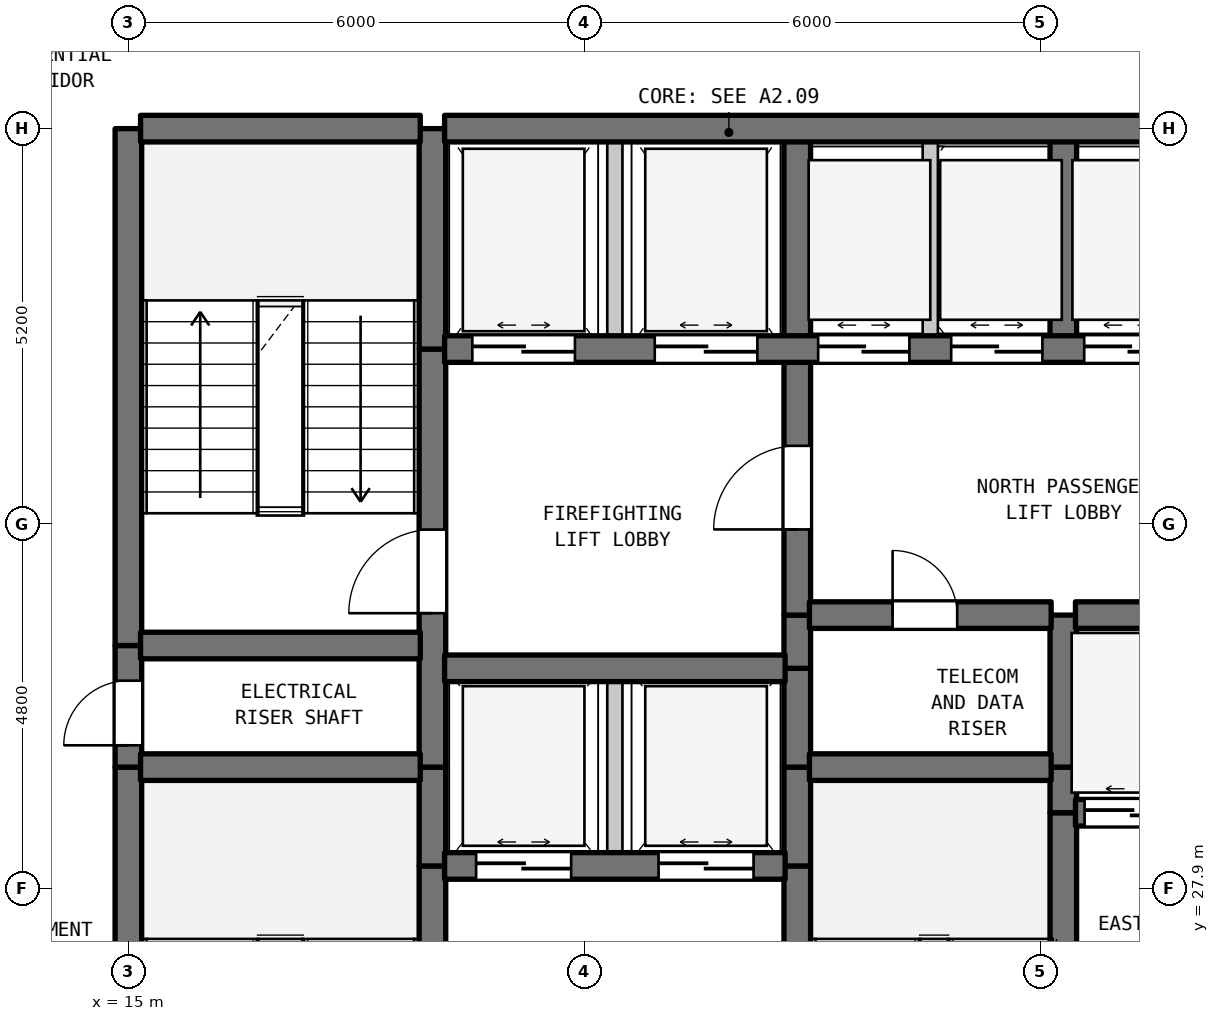
"""IFC4 building model, lengths in metres.
Left out: names, types, materials, properties, quantities, classifications, styles, units other than length and angle.
Written with IfcOpenShell. Run it as: python <this file> out.ifc"""

import sys

from ifc_helpers import new_model, si_unit, direction, frame, frame_2d, origin, place, context, subcontext, project, spatial, rectangle, extrude, element, fill, save


model = new_model("IFC4")
c1 = context("Model", 3, precision=1e-05, world=origin(), true_north=direction((0.0, 1.0)))
c2 = subcontext(c1, "Body", "Model", "MODEL_VIEW")
j1 = project(units=[si_unit("LENGTHUNIT", "METRE"), si_unit("PLANEANGLEUNIT", "RADIAN")], contexts=[c1])
p1 = place(None, origin())
s1 = spatial("IfcSite", under=j1, at=p1, CompositionType="ELEMENT")
p2 = place(p1, origin())
s2 = spatial("IfcBuilding", under=s1, at=p2, CompositionType="ELEMENT")
p3 = place(p2, frame((0.0, 0.0, 70.1)))
s3 = spatial("IfcBuildingStorey", under=s2, at=p3, CompositionType="ELEMENT", Elevation=70.1)
p4 = place(p3, frame((15.0, 22.7, 0.0), z_axis=(0.0, 0.0, 1.0), x_axis=(0.0, 1.0, 0.0)))
e1 = element("IfcWall", 1, at=p4, inside=s3, PredefinedType="SHEAR", context=c2, shape_type="SweptSolid", body=[
    extrude(rectangle(XDim=6.8, YDim=0.35, at=frame_2d((3.4, 0.0))), origin(), (0.0, 0.0, 1.0), 3.385),
])
p5 = place(p3, frame((15.0, 29.5, 0.0), z_axis=(0.0, 0.0, 1.0), x_axis=(0.0, 1.0, 0.0)))
e2 = element("IfcWall", 2, at=p5, inside=s3, PredefinedType="SHEAR", context=c2, shape_type="SweptSolid", body=[
    extrude(rectangle(XDim=1.6, YDim=0.35, at=frame_2d((0.8, 0.0))), origin(), (0.0, 0.0, 1.0), 3.385),
])
p6 = place(p5, frame((0.287, 0.0, 0.0)))
e3 = element("IfcOpeningElement", 3, at=p6, cuts=e2, PredefinedType="OPENING", context=c2, shape_type="SweptSolid", body=[
    extrude(rectangle(XDim=0.85, YDim=2.1, at=frame_2d((0.425, 1.05))), frame((0.0, 0.185, 0.0), z_axis=(0.0, -1.0, 0.0), x_axis=(1.0, 0.0, 0.0)), (0.0, 0.0, 1.0), 0.37),
])
p7 = place(p3, frame((15.0, 31.1, 0.0), z_axis=(0.0, 0.0, 1.0), x_axis=(0.0, 1.0, 0.0)))
e4 = element("IfcWall", 4, at=p7, inside=s3, PredefinedType="SHEAR", context=c2, shape_type="SweptSolid", body=[
    extrude(rectangle(XDim=6.8, YDim=0.35, at=frame_2d((3.4, 0.0))), origin(), (0.0, 0.0, 1.0), 3.385),
])
p8 = place(p3, frame((19.0, 22.7, 0.0), z_axis=(0.0, 0.0, 1.0), x_axis=(0.0, 1.0, 0.0)))
e5 = element("IfcWall", 5, at=p8, inside=s3, PredefinedType="SHEAR", context=c2, shape_type="SweptSolid", body=[
    extrude(rectangle(XDim=5.5, YDim=0.35, at=frame_2d((2.75, 0.0))), origin(), (0.0, 0.0, 1.0), 3.385),
])
p9 = place(p8, frame((0.631, 0.0, 0.0)))
e6 = element("IfcOpeningElement", 6, at=p9, cuts=e5, PredefinedType="OPENING", context=c2, shape_type="SweptSolid", body=[
    extrude(rectangle(XDim=1.1, YDim=2.15, at=frame_2d((0.55, 1.075))), frame((0.0, 0.185, 0.0), z_axis=(0.0, -1.0, 0.0), x_axis=(1.0, 0.0, 0.0)), (0.0, 0.0, 1.0), 0.37),
])
p10 = place(p3, frame((19.0, 28.2, 0.0), z_axis=(0.0, 0.0, 1.0), x_axis=(0.0, 1.0, 0.0)))
e7 = element("IfcWall", 7, at=p10, inside=s3, PredefinedType="SHEAR", context=c2, shape_type="SweptSolid", body=[
    extrude(rectangle(XDim=1.3, YDim=0.35, at=frame_2d((0.65, 0.0))), origin(), (0.0, 0.0, 1.0), 3.385),
])
p11 = place(p3, frame((19.0, 29.5, 0.0), z_axis=(0.0, 0.0, 1.0), x_axis=(0.0, 1.0, 0.0)))
e8 = element("IfcWall", 8, at=p11, inside=s3, PredefinedType="SHEAR", context=c2, shape_type="SweptSolid", body=[
    extrude(rectangle(XDim=5.5, YDim=0.35, at=frame_2d((2.75, 0.0))), origin(), (0.0, 0.0, 1.0), 3.385),
])
p12 = place(p11, frame((2.025, 0.0, 0.0)))
e9 = element("IfcOpeningElement", 9, at=p12, cuts=e8, PredefinedType="OPENING", context=c2, shape_type="SweptSolid", body=[
    extrude(rectangle(XDim=1.1, YDim=2.15, at=frame_2d((0.55, 1.075))), frame((0.0, 0.185, 0.0), z_axis=(0.0, -1.0, 0.0), x_axis=(1.0, 0.0, 0.0)), (0.0, 0.0, 1.0), 0.37),
])
p13 = place(p3, frame((19.0, 35.0, 0.0), z_axis=(0.0, 0.0, 1.0), x_axis=(0.0, 1.0, 0.0)))
e10 = element("IfcWall", 10, at=p13, inside=s3, PredefinedType="SHEAR", context=c2, shape_type="SweptSolid", body=[
    extrude(rectangle(XDim=2.9, YDim=0.35, at=frame_2d((1.45, 0.0))), origin(), (0.0, 0.0, 1.0), 3.385),
])
p14 = place(p3, frame((21.4, 28.2, 0.0), z_axis=(0.0, 0.0, 1.0), x_axis=(0.0, 1.0, 0.0)))
e11 = element("IfcWall", 11, at=p14, inside=s3, PredefinedType="STANDARD", context=c2, shape_type="SweptSolid", body=[
    extrude(rectangle(XDim=2.6, YDim=0.2, at=frame_2d((1.3, 0.0))), origin(), (0.0, 0.0, 1.0), 3.385),
])
p15 = place(p3, frame((21.4, 35.0, 0.0), z_axis=(0.0, 0.0, 1.0), x_axis=(0.0, 1.0, 0.0)))
e12 = element("IfcWall", 12, at=p15, inside=s3, PredefinedType="STANDARD", context=c2, shape_type="SweptSolid", body=[
    extrude(rectangle(XDim=2.9, YDim=0.2, at=frame_2d((1.45, 0.0))), origin(), (0.0, 0.0, 1.0), 3.385),
])
p16 = place(p3, frame((23.8, 22.7, 0.0), z_axis=(0.0, 0.0, 1.0), x_axis=(0.0, 1.0, 0.0)))
e13 = element("IfcWall", 13, at=p16, inside=s3, PredefinedType="SHEAR", context=c2, shape_type="SweptSolid", body=[
    extrude(rectangle(XDim=5.5, YDim=0.35, at=frame_2d((2.75, 0.0))), origin(), (0.0, 0.0, 1.0), 3.385),
])
p17 = place(p16, frame((0.235, 0.0, 0.0)))
e14 = element("IfcOpeningElement", 14, at=p17, cuts=e13, PredefinedType="OPENING", context=c2, shape_type="SweptSolid", body=[
    extrude(rectangle(XDim=1.1, YDim=2.15, at=frame_2d((0.55, 1.075))), frame((0.0, 0.185, 0.0), z_axis=(0.0, -1.0, 0.0), x_axis=(1.0, 0.0, 0.0)), (0.0, 0.0, 1.0), 0.37),
])
for number, where, z_axis, x_axis in (
    (15, (23.8, 28.2, 0.0), (0.0, 0.0, 1.0), (0.0, 1.0, 0.0)),
    (16, (23.8, 29.5, 0.0), (0.0, 0.0, 1.0), (0.0, 1.0, 0.0)),
):
    element("IfcWall", number, at=place(p3, frame(where, z_axis=z_axis, x_axis=x_axis)), inside=s3, PredefinedType="SHEAR", context=c2, shape_type="SweptSolid", body=[
        extrude(rectangle(XDim=1.3, YDim=0.35, at=frame_2d((0.65, 0.0))), origin(), (0.0, 0.0, 1.0), 3.385),
    ])
p18 = place(p3, frame((23.8, 30.8, 0.0), z_axis=(0.0, 0.0, 1.0), x_axis=(0.0, 1.0, 0.0)))
e17 = element("IfcWall", 17, at=p18, inside=s3, PredefinedType="SHEAR", context=c2, shape_type="SweptSolid", body=[
    extrude(rectangle(XDim=0.7, YDim=0.35, at=frame_2d((0.35, 0.0))), origin(), (0.0, 0.0, 1.0), 3.385),
])
p19 = place(p3, frame((23.8, 31.5, 0.0), z_axis=(0.0, 0.0, 1.0), x_axis=(0.0, 1.0, 0.0)))
e18 = element("IfcWall", 18, at=p19, inside=s3, PredefinedType="SHEAR", context=c2, shape_type="SweptSolid", body=[
    extrude(rectangle(XDim=3.5, YDim=0.35, at=frame_2d((1.75, 0.0))), origin(), (0.0, 0.0, 1.0), 3.385),
])
p20 = place(p19, frame((1.127, 0.0, 0.0)))
e19 = element("IfcOpeningElement", 19, at=p20, cuts=e18, PredefinedType="OPENING", context=c2, shape_type="SweptSolid", body=[
    extrude(rectangle(XDim=1.1, YDim=2.15, at=frame_2d((0.55, 1.075))), frame((0.0, 0.185, 0.0), z_axis=(0.0, -1.0, 0.0), x_axis=(1.0, 0.0, 0.0)), (0.0, 0.0, 1.0), 0.37),
])
p21 = place(p3, frame((23.8, 35.0, 0.0), z_axis=(0.0, 0.0, 1.0), x_axis=(0.0, 1.0, 0.0)))
e20 = element("IfcWall", 20, at=p21, inside=s3, PredefinedType="SHEAR", context=c2, shape_type="SweptSolid", body=[
    extrude(rectangle(XDim=2.9, YDim=0.35, at=frame_2d((1.45, 0.0))), origin(), (0.0, 0.0, 1.0), 3.385),
])
p22 = place(p3, frame((25.55, 35.0, 0.0), z_axis=(0.0, 0.0, 1.0), x_axis=(0.0, 1.0, 0.0)))
e21 = element("IfcWall", 21, at=p22, inside=s3, PredefinedType="STANDARD", context=c2, shape_type="SweptSolid", body=[
    extrude(rectangle(XDim=2.9, YDim=0.2, at=frame_2d((1.45, 0.0))), origin(), (0.0, 0.0, 1.0), 3.385),
])
p23 = place(p3, frame((27.3, 25.6, 0.0), z_axis=(0.0, 0.0, 1.0), x_axis=(0.0, 1.0, 0.0)))
e22 = element("IfcWall", 22, at=p23, inside=s3, PredefinedType="SHEAR", context=c2, shape_type="SweptSolid", body=[
    extrude(rectangle(XDim=3.3, YDim=0.35, at=frame_2d((1.65, 0.0))), origin(), (0.0, 0.0, 1.0), 3.385),
])
p24 = place(p3, frame((27.3, 28.9, 0.0), z_axis=(0.0, 0.0, 1.0), x_axis=(0.0, 1.0, 0.0)))
e23 = element("IfcWall", 23, at=p24, inside=s3, PredefinedType="SHEAR", context=c2, shape_type="SweptSolid", body=[
    extrude(rectangle(XDim=0.6, YDim=0.35, at=frame_2d((0.3, 0.0))), origin(), (0.0, 0.0, 1.0), 3.385),
])
p25 = place(p3, frame((27.3, 29.5, 0.0), z_axis=(0.0, 0.0, 1.0), x_axis=(0.0, 1.0, 0.0)))
e24 = element("IfcWall", 24, at=p25, inside=s3, PredefinedType="SHEAR", context=c2, shape_type="SweptSolid", body=[
    extrude(rectangle(XDim=2.0, YDim=0.35, at=frame_2d((1.0, 0.0))), origin(), (0.0, 0.0, 1.0), 3.385),
])
p26 = place(p3, frame((27.3, 35.0, 0.0), z_axis=(0.0, 0.0, 1.0), x_axis=(0.0, 1.0, 0.0)))
e25 = element("IfcWall", 25, at=p26, inside=s3, PredefinedType="SHEAR", context=c2, shape_type="SweptSolid", body=[
    extrude(rectangle(XDim=2.9, YDim=0.35, at=frame_2d((1.45, 0.0))), origin(), (0.0, 0.0, 1.0), 3.385),
])
p27 = place(p3, frame((19.16, 28.2, 0.0), z_axis=(0.0, 0.0, 1.0), x_axis=(1.0, 0.0, 0.0)))
e26 = element("IfcWall", 26, at=p27, inside=s3, PredefinedType="SHEAR", context=c2, shape_type="SweptSolid", body=[
    extrude(rectangle(XDim=4.48, YDim=0.35, at=frame_2d((2.24, 0.0))), origin(), (0.0, 0.0, 1.0), 3.385),
])
p28 = place(p27, frame((0.415, 0.0, 0.0)))
e27 = element("IfcOpeningElement", 27, at=p28, cuts=e26, PredefinedType="OPENING", context=c2, shape_type="SweptSolid", body=[
    extrude(rectangle(XDim=1.25, YDim=2.2, at=frame_2d((0.625, 1.1))), frame((0.0, 0.185, 0.0), z_axis=(0.0, -1.0, 0.0), x_axis=(1.0, 0.0, 0.0)), (0.0, 0.0, 1.0), 0.37),
])
p29 = place(p27, frame((2.815, 0.0, 0.0)))
e28 = element("IfcOpeningElement", 28, at=p29, cuts=e26, PredefinedType="OPENING", context=c2, shape_type="SweptSolid", body=[
    extrude(rectangle(XDim=1.25, YDim=2.2, at=frame_2d((0.625, 1.1))), frame((0.0, 0.185, 0.0), z_axis=(0.0, -1.0, 0.0), x_axis=(1.0, 0.0, 0.0)), (0.0, 0.0, 1.0), 0.37),
])
p30 = place(p3, frame((27.46, 28.9, 0.0), z_axis=(0.0, 0.0, 1.0), x_axis=(1.0, 0.0, 0.0)))
e29 = element("IfcWall", 29, at=p30, inside=s3, PredefinedType="SHEAR", context=c2, shape_type="SweptSolid", body=[
    extrude(rectangle(XDim=3.18, YDim=0.35, at=frame_2d((1.59, 0.0))), origin(), (0.0, 0.0, 1.0), 3.385),
])
p31 = place(p30, frame((0.12, 0.0, 0.0)))
e30 = element("IfcOpeningElement", 30, at=p31, cuts=e29, PredefinedType="OPENING", context=c2, shape_type="SweptSolid", body=[
    extrude(rectangle(XDim=1.25, YDim=2.2, at=frame_2d((0.625, 1.1))), frame((0.0, 0.185, 0.0), z_axis=(0.0, -1.0, 0.0), x_axis=(1.0, 0.0, 0.0)), (0.0, 0.0, 1.0), 0.37),
])
p32 = place(p30, frame((1.81, 0.0, 0.0)))
e31 = element("IfcOpeningElement", 31, at=p32, cuts=e29, PredefinedType="OPENING", context=c2, shape_type="SweptSolid", body=[
    extrude(rectangle(XDim=1.25, YDim=2.2, at=frame_2d((0.625, 1.1))), frame((0.0, 0.185, 0.0), z_axis=(0.0, -1.0, 0.0), x_axis=(1.0, 0.0, 0.0)), (0.0, 0.0, 1.0), 0.37),
])
p33 = place(p3, frame((15.16, 29.5, 0.0), z_axis=(0.0, 0.0, 1.0), x_axis=(1.0, 0.0, 0.0)))
e32 = element("IfcWall", 32, at=p33, inside=s3, PredefinedType="SHEAR", context=c2, shape_type="SweptSolid", body=[
    extrude(rectangle(XDim=3.68, YDim=0.35, at=frame_2d((1.84, 0.0))), origin(), (0.0, 0.0, 1.0), 3.385),
])
p34 = place(p3, frame((23.96, 29.5, 0.0), z_axis=(0.0, 0.0, 1.0), x_axis=(1.0, 0.0, 0.0)))
e33 = element("IfcWall", 33, at=p34, inside=s3, PredefinedType="SHEAR", context=c2, shape_type="SweptSolid", body=[
    extrude(rectangle(XDim=3.18, YDim=0.35, at=frame_2d((1.59, 0.0))), origin(), (0.0, 0.0, 1.0), 3.385),
])
p35 = place(p3, frame((19.16, 30.8, 0.0), z_axis=(0.0, 0.0, 1.0), x_axis=(1.0, 0.0, 0.0)))
e34 = element("IfcWall", 34, at=p35, inside=s3, PredefinedType="SHEAR", context=c2, shape_type="SweptSolid", body=[
    extrude(rectangle(XDim=4.48, YDim=0.35, at=frame_2d((2.24, 0.0))), origin(), (0.0, 0.0, 1.0), 3.385),
])
p36 = place(p3, frame((15.16, 31.1, 0.0), z_axis=(0.0, 0.0, 1.0), x_axis=(1.0, 0.0, 0.0)))
e35 = element("IfcWall", 35, at=p36, inside=s3, PredefinedType="SHEAR", context=c2, shape_type="SweptSolid", body=[
    extrude(rectangle(XDim=3.68, YDim=0.35, at=frame_2d((1.84, 0.0))), origin(), (0.0, 0.0, 1.0), 3.385),
])
p37 = place(p3, frame((23.96, 31.5, 0.0), z_axis=(0.0, 0.0, 1.0), x_axis=(1.0, 0.0, 0.0)))
e36 = element("IfcWall", 36, at=p37, inside=s3, PredefinedType="SHEAR", context=c2, shape_type="SweptSolid", body=[
    extrude(rectangle(XDim=3.18, YDim=0.35, at=frame_2d((1.59, 0.0))), origin(), (0.0, 0.0, 1.0), 3.385),
])
p38 = place(p37, frame((1.094, 0.0, 0.0)))
e37 = element("IfcOpeningElement", 37, at=p38, cuts=e36, PredefinedType="OPENING", context=c2, shape_type="SweptSolid", body=[
    extrude(rectangle(XDim=0.85, YDim=2.1, at=frame_2d((0.425, 1.05))), frame((0.0, 0.185, 0.0), z_axis=(0.0, -1.0, 0.0), x_axis=(1.0, 0.0, 0.0)), (0.0, 0.0, 1.0), 0.37),
])
p39 = place(p3, frame((27.46, 31.5, 0.0), z_axis=(0.0, 0.0, 1.0), x_axis=(1.0, 0.0, 0.0)))
e38 = element("IfcWall", 38, at=p39, inside=s3, PredefinedType="SHEAR", context=c2, shape_type="SweptSolid", body=[
    extrude(rectangle(XDim=3.18, YDim=0.35, at=frame_2d((1.59, 0.0))), origin(), (0.0, 0.0, 1.0), 3.385),
])
p40 = place(p3, frame((19.16, 35.0, 0.0), z_axis=(0.0, 0.0, 1.0), x_axis=(1.0, 0.0, 0.0)))
e39 = element("IfcWall", 39, at=p40, inside=s3, PredefinedType="SHEAR", context=c2, shape_type="SweptSolid", body=[
    extrude(rectangle(XDim=11.48, YDim=0.35, at=frame_2d((5.74, 0.0))), origin(), (0.0, 0.0, 1.0), 3.385),
])
p41 = place(p40, frame((0.365, 0.0, 0.0)))
e40 = element("IfcOpeningElement", 40, at=p41, cuts=e39, PredefinedType="OPENING", context=c2, shape_type="SweptSolid", body=[
    extrude(rectangle(XDim=1.35, YDim=2.2, at=frame_2d((0.675, 1.1))), frame((0.0, 0.185, 0.0), z_axis=(0.0, -1.0, 0.0), x_axis=(1.0, 0.0, 0.0)), (0.0, 0.0, 1.0), 0.37),
])
p42 = place(p40, frame((2.765, 0.0, 0.0)))
e41 = element("IfcOpeningElement", 41, at=p42, cuts=e39, PredefinedType="OPENING", context=c2, shape_type="SweptSolid", body=[
    extrude(rectangle(XDim=1.35, YDim=2.2, at=frame_2d((0.675, 1.1))), frame((0.0, 0.185, 0.0), z_axis=(0.0, -1.0, 0.0), x_axis=(1.0, 0.0, 0.0)), (0.0, 0.0, 1.0), 0.37),
])
p43 = place(p40, frame((4.915, 0.0, 0.0)))
e42 = element("IfcOpeningElement", 42, at=p43, cuts=e39, PredefinedType="OPENING", context=c2, shape_type="SweptSolid", body=[
    extrude(rectangle(XDim=1.2, YDim=2.2, at=frame_2d((0.6, 1.1))), frame((0.0, 0.185, 0.0), z_axis=(0.0, -1.0, 0.0), x_axis=(1.0, 0.0, 0.0)), (0.0, 0.0, 1.0), 0.37),
])
p44 = place(p40, frame((6.665, 0.0, 0.0)))
e43 = element("IfcOpeningElement", 43, at=p44, cuts=e39, PredefinedType="OPENING", context=c2, shape_type="SweptSolid", body=[
    extrude(rectangle(XDim=1.2, YDim=2.2, at=frame_2d((0.6, 1.1))), frame((0.0, 0.185, 0.0), z_axis=(0.0, -1.0, 0.0), x_axis=(1.0, 0.0, 0.0)), (0.0, 0.0, 1.0), 0.37),
])
p45 = place(p40, frame((8.415, 0.0, 0.0)))
e44 = element("IfcOpeningElement", 44, at=p45, cuts=e39, PredefinedType="OPENING", context=c2, shape_type="SweptSolid", body=[
    extrude(rectangle(XDim=1.2, YDim=2.2, at=frame_2d((0.6, 1.1))), frame((0.0, 0.185, 0.0), z_axis=(0.0, -1.0, 0.0), x_axis=(1.0, 0.0, 0.0)), (0.0, 0.0, 1.0), 0.37),
])
p46 = place(p40, frame((10.16, 0.0, 0.0)))
e45 = element("IfcOpeningElement", 45, at=p46, cuts=e39, PredefinedType="OPENING", context=c2, shape_type="SweptSolid", body=[
    extrude(rectangle(XDim=1.2, YDim=2.2, at=frame_2d((0.6, 1.1))), frame((0.0, 0.185, 0.0), z_axis=(0.0, -1.0, 0.0), x_axis=(1.0, 0.0, 0.0)), (0.0, 0.0, 1.0), 0.37),
])
p47 = place(p3, frame((15.16, 37.9, 0.0), z_axis=(0.0, 0.0, 1.0), x_axis=(1.0, 0.0, 0.0)))
e46 = element("IfcWall", 46, at=p47, inside=s3, PredefinedType="SHEAR", context=c2, shape_type="SweptSolid", body=[
    extrude(rectangle(XDim=3.68, YDim=0.35, at=frame_2d((1.84, 0.0))), origin(), (0.0, 0.0, 1.0), 3.385),
])
p48 = place(p3, frame((19.16, 37.9, 0.0), z_axis=(0.0, 0.0, 1.0), x_axis=(1.0, 0.0, 0.0)))
e47 = element("IfcWall", 47, at=p48, inside=s3, PredefinedType="SHEAR", context=c2, shape_type="SweptSolid", body=[
    extrude(rectangle(XDim=11.48, YDim=0.35, at=frame_2d((5.74, 0.0))), origin(), (0.0, 0.0, 1.0), 3.385),
])
p49 = place(p6, origin())
e48 = element("IfcDoor", 48, at=p49, inside=s3, OperationType="SINGLE_SWING_LEFT", PredefinedType="DOOR", context=c2, shape_type="SweptSolid", body=[
    extrude(rectangle(XDim=0.85, YDim=2.1, at=frame_2d((0.425, 1.05))), frame((0.0, 0.025, 0.0), z_axis=(0.0, -1.0, 0.0), x_axis=(1.0, 0.0, 0.0)), (0.0, 0.0, 1.0), 0.05),
])
fill(e3, e48)
p50 = place(p12, origin())
e49 = element("IfcDoor", 49, at=p50, inside=s3, OperationType="SINGLE_SWING_LEFT", PredefinedType="DOOR", context=c2, shape_type="SweptSolid", body=[
    extrude(rectangle(XDim=1.1, YDim=2.15, at=frame_2d((0.55, 1.075))), frame((0.0, 0.025, 0.0), z_axis=(0.0, -1.0, 0.0), x_axis=(1.0, 0.0, 0.0)), (0.0, 0.0, 1.0), 0.05),
])
fill(e9, e49)
p51 = place(p20, origin())
e50 = element("IfcDoor", 50, at=p51, inside=s3, OperationType="SINGLE_SWING_LEFT", PredefinedType="DOOR", context=c2, shape_type="SweptSolid", body=[
    extrude(rectangle(XDim=1.1, YDim=2.15, at=frame_2d((0.55, 1.075))), frame((0.0, 0.025, 0.0), z_axis=(0.0, -1.0, 0.0), x_axis=(1.0, 0.0, 0.0)), (0.0, 0.0, 1.0), 0.05),
])
fill(e19, e50)
p52 = place(p28, origin())
e51 = element("IfcDoor", 51, at=p52, inside=s3, OperationType="DOUBLE_DOOR_SLIDING", PredefinedType="DOOR", context=c2, shape_type="SweptSolid", body=[
    extrude(rectangle(XDim=1.25, YDim=2.2, at=frame_2d((0.625, 1.1))), frame((0.0, 0.025, 0.0), z_axis=(0.0, -1.0, 0.0), x_axis=(1.0, 0.0, 0.0)), (0.0, 0.0, 1.0), 0.05),
])
fill(e27, e51)
p53 = place(p29, origin())
e52 = element("IfcDoor", 52, at=p53, inside=s3, OperationType="DOUBLE_DOOR_SLIDING", PredefinedType="DOOR", context=c2, shape_type="SweptSolid", body=[
    extrude(rectangle(XDim=1.25, YDim=2.2, at=frame_2d((0.625, 1.1))), frame((0.0, 0.025, 0.0), z_axis=(0.0, -1.0, 0.0), x_axis=(1.0, 0.0, 0.0)), (0.0, 0.0, 1.0), 0.05),
])
fill(e28, e52)
p54 = place(p31, origin())
e53 = element("IfcDoor", 53, at=p54, inside=s3, OperationType="DOUBLE_DOOR_SLIDING", PredefinedType="DOOR", context=c2, shape_type="SweptSolid", body=[
    extrude(rectangle(XDim=1.25, YDim=2.2, at=frame_2d((0.625, 1.1))), frame((0.0, 0.025, 0.0), z_axis=(0.0, -1.0, 0.0), x_axis=(1.0, 0.0, 0.0)), (0.0, 0.0, 1.0), 0.05),
])
fill(e30, e53)
p55 = place(p38, origin())
e54 = element("IfcDoor", 54, at=p55, inside=s3, OperationType="SINGLE_SWING_LEFT", PredefinedType="DOOR", context=c2, shape_type="SweptSolid", body=[
    extrude(rectangle(XDim=0.85, YDim=2.1, at=frame_2d((0.425, 1.05))), frame((0.0, 0.025, 0.0), z_axis=(0.0, -1.0, 0.0), x_axis=(1.0, 0.0, 0.0)), (0.0, 0.0, 1.0), 0.05),
])
fill(e37, e54)
p56 = place(p41, origin())
e55 = element("IfcDoor", 55, at=p56, inside=s3, OperationType="DOUBLE_DOOR_SLIDING", PredefinedType="DOOR", context=c2, shape_type="SweptSolid", body=[
    extrude(rectangle(XDim=1.35, YDim=2.2, at=frame_2d((0.675, 1.1))), frame((0.0, 0.025, 0.0), z_axis=(0.0, -1.0, 0.0), x_axis=(1.0, 0.0, 0.0)), (0.0, 0.0, 1.0), 0.05),
])
fill(e40, e55)
p57 = place(p42, origin())
e56 = element("IfcDoor", 56, at=p57, inside=s3, OperationType="DOUBLE_DOOR_SLIDING", PredefinedType="DOOR", context=c2, shape_type="SweptSolid", body=[
    extrude(rectangle(XDim=1.35, YDim=2.2, at=frame_2d((0.675, 1.1))), frame((0.0, 0.025, 0.0), z_axis=(0.0, -1.0, 0.0), x_axis=(1.0, 0.0, 0.0)), (0.0, 0.0, 1.0), 0.05),
])
fill(e41, e56)
p58 = place(p43, origin())
e57 = element("IfcDoor", 57, at=p58, inside=s3, OperationType="DOUBLE_DOOR_SLIDING", PredefinedType="DOOR", context=c2, shape_type="SweptSolid", body=[
    extrude(rectangle(XDim=1.2, YDim=2.2, at=frame_2d((0.6, 1.1))), frame((0.0, 0.025, 0.0), z_axis=(0.0, -1.0, 0.0), x_axis=(1.0, 0.0, 0.0)), (0.0, 0.0, 1.0), 0.05),
])
fill(e42, e57)
p59 = place(p44, origin())
e58 = element("IfcDoor", 58, at=p59, inside=s3, OperationType="DOUBLE_DOOR_SLIDING", PredefinedType="DOOR", context=c2, shape_type="SweptSolid", body=[
    extrude(rectangle(XDim=1.2, YDim=2.2, at=frame_2d((0.6, 1.1))), frame((0.0, 0.025, 0.0), z_axis=(0.0, -1.0, 0.0), x_axis=(1.0, 0.0, 0.0)), (0.0, 0.0, 1.0), 0.05),
])
fill(e43, e58)
p60 = place(p45, origin())
e59 = element("IfcDoor", 59, at=p60, inside=s3, OperationType="DOUBLE_DOOR_SLIDING", PredefinedType="DOOR", context=c2, shape_type="SweptSolid", body=[
    extrude(rectangle(XDim=1.2, YDim=2.2, at=frame_2d((0.6, 1.1))), frame((0.0, 0.025, 0.0), z_axis=(0.0, -1.0, 0.0), x_axis=(1.0, 0.0, 0.0)), (0.0, 0.0, 1.0), 0.05),
])
fill(e44, e59)
save(model, sys.argv[1])
